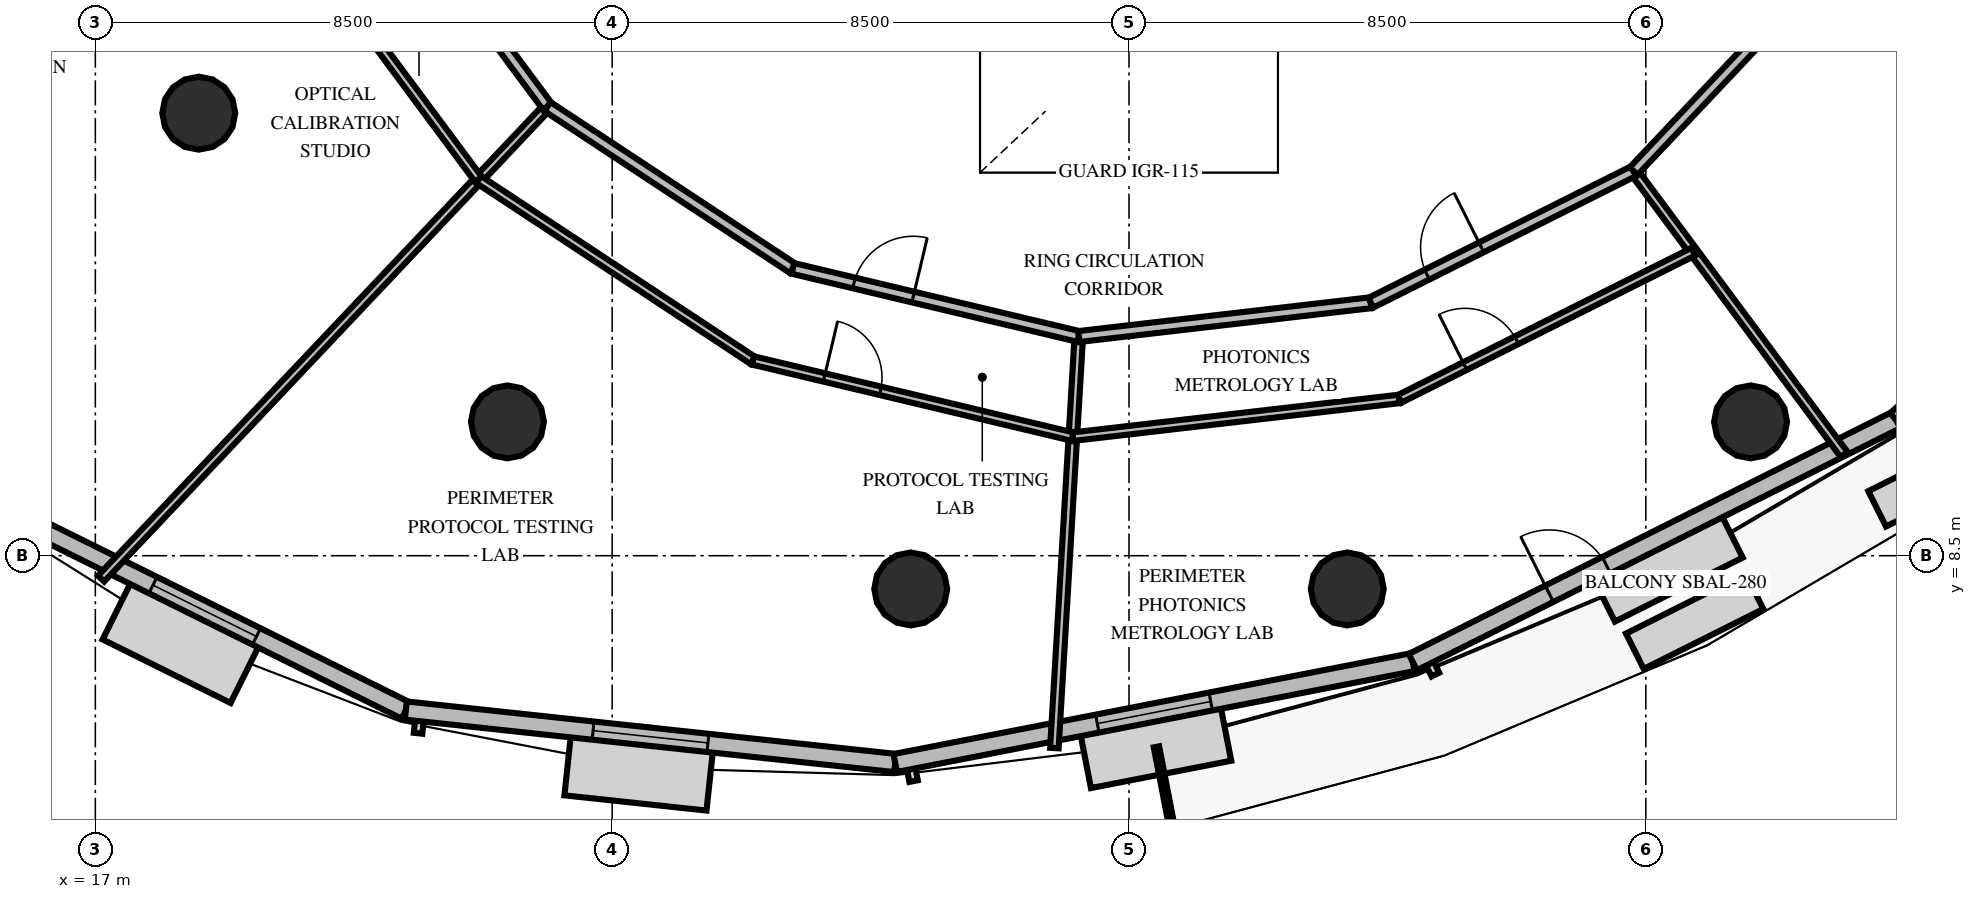
"""IFC4 building model, lengths in metres.
Left out: names, types, materials, properties, quantities, classifications, styles, units other than length and angle.
Written with IfcOpenShell. Run it as: python <this file> out.ifc"""

import sys

from ifc_helpers import new_model, si_unit, direction, frame, frame_2d, origin, origin_2d, place, context, subcontext, project, spatial, rectangle, circle, extrude, element, fill, save


model = new_model("IFC4")
c1 = context("Model", 3, precision=1e-05, world=origin(), true_north=direction((0.0, 1.0)))
c2 = subcontext(c1, "Body", "Model", "MODEL_VIEW")
j1 = project(units=[si_unit("LENGTHUNIT", "METRE"), si_unit("PLANEANGLEUNIT", "RADIAN")], contexts=[c1])
p1 = place(None, origin())
s1 = spatial("IfcSite", under=j1, at=p1, CompositionType="ELEMENT")
p2 = place(p1, origin())
s2 = spatial("IfcBuilding", under=s1, at=p2, CompositionType="ELEMENT")
p3 = place(p2, frame((0.0, 0.0, 145.8)))
s3 = spatial("IfcBuildingStorey", under=s2, at=p3, CompositionType="ELEMENT", Elevation=145.8)
for number, where, z_axis, x_axis in (
    (1, (18.701, 15.778, 0.0), (0.0, 0.0, 1.0), (1.0, 0.0, 0.0)),
    (2, (23.778, 10.701, 0.0), (0.0, 0.0, 1.0), (1.0, 0.0, 0.0)),
    (3, (30.41, 7.954, 0.0), (0.0, 0.0, 1.0), (1.0, 0.0, 0.0)),
    (4, (37.59, 7.954, 0.0), (0.0, 0.0, 1.0), (1.0, 0.0, 0.0)),
    (5, (44.222, 10.701, 0.0), (0.0, 0.0, 1.0), (1.0, 0.0, 0.0)),
):
    element("IfcColumn", number, at=place(p3, frame(where, z_axis=z_axis, x_axis=x_axis)), inside=s3, PredefinedType="COLUMN", context=c2, shape_type="SweptSolid", body=[
        extrude(circle(Radius=0.6, at=origin_2d()), origin(), (0.0, 0.0, 1.0), 4.0),
    ])
p4 = place(p3, frame((15.492, 9.235, 0.0), z_axis=(0.0, 0.0, 1.0), x_axis=(0.895870813497, -0.444314624477, 0.0)))
e6 = element("IfcWall", 6, at=p4, inside=s3, PredefinedType="SOLIDWALL", context=c2, shape_type="SweptSolid", body=[
    extrude(rectangle(XDim=7.383, YDim=0.3, at=frame_2d((3.692, 0.0))), origin(), (0.0, 0.0, 1.0), 2.9),
])
p5 = place(p4, frame((2.742, 0.0, 0.8)))
e7 = element("IfcOpeningElement", 7, at=p5, cuts=e6, PredefinedType="OPENING", context=c2, shape_type="SweptSolid", body=[
    extrude(rectangle(XDim=1.9, YDim=1.95, at=frame_2d((0.95, 0.975))), frame((0.0, 0.16, 0.0), z_axis=(0.0, -1.0, 0.0), x_axis=(1.0, 0.0, 0.0)), (0.0, 0.0, 1.0), 0.32),
])
p6 = place(p3, frame((22.106, 5.954, 0.0), z_axis=(0.0, 0.0, 1.0), x_axis=(0.994303675946, -0.106584238983, 0.0)))
e8 = element("IfcWall", 8, at=p6, inside=s3, PredefinedType="SOLIDWALL", context=c2, shape_type="SweptSolid", body=[
    extrude(rectangle(XDim=8.095, YDim=0.3, at=frame_2d((4.047, 0.0))), origin(), (0.0, 0.0, 1.0), 2.9),
])
p7 = place(p6, frame((3.098, 0.0, 0.8)))
e9 = element("IfcOpeningElement", 9, at=p7, cuts=e8, PredefinedType="OPENING", context=c2, shape_type="SweptSolid", body=[
    extrude(rectangle(XDim=1.9, YDim=1.95, at=frame_2d((0.95, 0.975))), frame((0.0, 0.16, 0.0), z_axis=(0.0, -1.0, 0.0), x_axis=(1.0, 0.0, 0.0)), (0.0, 0.0, 1.0), 0.32),
])
p8 = place(p3, frame((30.155, 5.091, 0.0), z_axis=(0.0, 0.0, 1.0), x_axis=(0.981531349689, 0.191301358011, 0.0)))
e10 = element("IfcWall", 10, at=p8, inside=s3, PredefinedType="SOLIDWALL", context=c2, shape_type="SweptSolid", body=[
    extrude(rectangle(XDim=8.673, YDim=0.3, at=frame_2d((4.336, 0.0))), origin(), (0.0, 0.0, 1.0), 2.9),
])
p9 = place(p8, frame((3.386, 0.0, 0.8)))
e11 = element("IfcOpeningElement", 11, at=p9, cuts=e10, PredefinedType="OPENING", context=c2, shape_type="SweptSolid", body=[
    extrude(rectangle(XDim=1.9, YDim=1.95, at=frame_2d((0.95, 0.975))), frame((0.0, 0.16, 0.0), z_axis=(0.0, -1.0, 0.0), x_axis=(1.0, 0.0, 0.0)), (0.0, 0.0, 1.0), 0.32),
])
p10 = place(p3, frame((38.668, 6.75, 0.0), z_axis=(0.0, 0.0, 1.0), x_axis=(0.894163416392, 0.447740756227, 0.0)))
e12 = element("IfcWall", 12, at=p10, inside=s3, PredefinedType="SOLIDWALL", context=c2, shape_type="SweptSolid", body=[
    extrude(rectangle(XDim=8.891, YDim=0.3, at=frame_2d((4.445, 0.0))), origin(), (0.0, 0.0, 1.0), 2.9),
])
p11 = place(p10, frame((2.51, 0.0, 0.0)))
e13 = element("IfcOpeningElement", 13, at=p11, cuts=e12, PredefinedType="OPENING", context=c2, shape_type="SweptSolid", body=[
    extrude(rectangle(XDim=1.05, YDim=2.15, at=frame_2d((0.525, 1.075))), frame((0.0, 0.16, 0.0), z_axis=(0.0, -1.0, 0.0), x_axis=(1.0, 0.0, 0.0)), (0.0, 0.0, 1.0), 0.32),
])
p12 = place(p3, frame((46.618, 10.731, 0.0), z_axis=(0.0, 0.0, 1.0), x_axis=(0.741123503334, 0.671368715987, 0.0)))
e14 = element("IfcWall", 14, at=p12, inside=s3, PredefinedType="SOLIDWALL", context=c2, shape_type="SweptSolid", body=[
    extrude(rectangle(XDim=8.673, YDim=0.3, at=frame_2d((4.336, 0.0))), origin(), (0.0, 0.0, 1.0), 2.9),
])
p13 = place(p12, frame((3.386, 0.0, 0.8)))
e15 = element("IfcOpeningElement", 15, at=p13, cuts=e14, PredefinedType="OPENING", context=c2, shape_type="SweptSolid", body=[
    extrude(rectangle(XDim=1.9, YDim=1.95, at=frame_2d((0.95, 0.975))), frame((0.0, 0.16, 0.0), z_axis=(0.0, -1.0, 0.0), x_axis=(1.0, 0.0, 0.0)), (0.0, 0.0, 1.0), 0.32),
])
p14 = place(p3, frame((24.436, 15.886, 0.0), z_axis=(0.0, 0.0, 1.0), x_axis=(-0.687099784948, -0.726563063694, 0.0)))
e16 = element("IfcWall", 16, at=p14, inside=s3, PredefinedType="PARTITIONING", context=c2, shape_type="SweptSolid", body=[
    extrude(rectangle(XDim=10.684, YDim=0.14, at=frame_2d((5.342, 0.0))), origin(), (0.0, 0.0, 1.0), 2.8),
])
p15 = place(p3, frame((21.553, 19.767, 0.0), z_axis=(0.0, 0.0, 1.0), x_axis=(0.596219858709, -0.802821200568, 0.0)))
e17 = element("IfcWall", 17, at=p15, inside=s3, PredefinedType="PARTITIONING", context=c2, shape_type="SweptSolid", body=[
    extrude(rectangle(XDim=4.834, YDim=0.18, at=frame_2d((2.417, 0.0))), origin(), (0.0, 0.0, 1.0), 2.8),
])
p16 = place(p3, frame((20.078, 19.028, 0.0), z_axis=(0.0, 0.0, 1.0), x_axis=(0.596244197079, -0.802803124963, 0.0)))
e18 = element("IfcWall", 18, at=p16, inside=s3, PredefinedType="PARTITIONING", context=c2, shape_type="SweptSolid", body=[
    extrude(rectangle(XDim=5.407, YDim=0.14, at=frame_2d((2.704, 0.0))), origin(), (0.0, 0.0, 1.0), 2.8),
])
p17 = place(p3, frame((33.175, 12.104, 0.0), z_axis=(0.0, 0.0, 1.0), x_axis=(-0.059306722547, -0.998239807191, 0.0)))
e19 = element("IfcWall", 19, at=p17, inside=s3, PredefinedType="PARTITIONING", context=c2, shape_type="SweptSolid", body=[
    extrude(rectangle(XDim=6.78, YDim=0.14, at=frame_2d((3.39, 0.0))), origin(), (0.0, 0.0, 1.0), 2.8),
])
p18 = place(p3, frame((24.436, 15.886, 0.0), z_axis=(0.0, 0.0, 1.0), x_axis=(0.834852183568, -0.550474187943, 0.0)))
e20 = element("IfcWall", 20, at=p18, inside=s3, PredefinedType="PARTITIONING", context=c2, shape_type="SweptSolid", body=[
    extrude(rectangle(XDim=4.834, YDim=0.18, at=frame_2d((2.417, 0.0))), origin(), (0.0, 0.0, 1.0), 2.8),
])
p19 = place(p3, frame((28.472, 13.225, 0.0), z_axis=(0.0, 0.0, 1.0), x_axis=(0.972776947404, -0.231743415441, 0.0)))
e21 = element("IfcWall", 21, at=p19, inside=s3, PredefinedType="PARTITIONING", context=c2, shape_type="SweptSolid", body=[
    extrude(rectangle(XDim=4.834, YDim=0.18, at=frame_2d((2.417, 0.0))), origin(), (0.0, 0.0, 1.0), 2.8),
])
p20 = place(p19, frame((1.034, 0.0, 0.0)))
e22 = element("IfcOpeningElement", 22, at=p20, cuts=e21, PredefinedType="OPENING", context=c2, shape_type="SweptSolid", body=[
    extrude(rectangle(XDim=1.0, YDim=2.15, at=frame_2d((0.5, 1.075))), frame((0.0, 0.1, 0.0), z_axis=(0.0, -1.0, 0.0), x_axis=(1.0, 0.0, 0.0)), (0.0, 0.0, 1.0), 0.2),
])
p21 = place(p3, frame((23.302, 14.687, 0.0), z_axis=(0.0, 0.0, 1.0), x_axis=(0.834859649207, -0.550462865347, 0.0)))
e23 = element("IfcWall", 23, at=p21, inside=s3, PredefinedType="PARTITIONING", context=c2, shape_type="SweptSolid", body=[
    extrude(rectangle(XDim=5.407, YDim=0.14, at=frame_2d((2.704, 0.0))), origin(), (0.0, 0.0, 1.0), 2.8),
])
p22 = place(p3, frame((27.816, 11.711, 0.0), z_axis=(0.0, 0.0, 1.0), x_axis=(0.972775687213, -0.231748705211, 0.0)))
e24 = element("IfcWall", 24, at=p22, inside=s3, PredefinedType="PARTITIONING", context=c2, shape_type="SweptSolid", body=[
    extrude(rectangle(XDim=5.407, YDim=0.14, at=frame_2d((2.704, 0.0))), origin(), (0.0, 0.0, 1.0), 2.8),
])
p23 = place(p22, frame((1.204, 0.0, 0.0)))
e25 = element("IfcOpeningElement", 25, at=p23, cuts=e24, PredefinedType="OPENING", context=c2, shape_type="SweptSolid", body=[
    extrude(rectangle(XDim=0.95, YDim=2.15, at=frame_2d((0.475, 1.075))), frame((0.0, 0.08, 0.0), z_axis=(0.0, -1.0, 0.0), x_axis=(1.0, 0.0, 0.0)), (0.0, 0.0, 1.0), 0.16),
])
p24 = place(p3, frame((42.3, 14.825, 0.0), z_axis=(0.0, 0.0, 1.0), x_axis=(0.596217105749, -0.802823245062, 0.0)))
e26 = element("IfcWall", 26, at=p24, inside=s3, PredefinedType="PARTITIONING", context=c2, shape_type="SweptSolid", body=[
    extrude(rectangle(XDim=5.803, YDim=0.14, at=frame_2d((2.902, 0.0))), origin(), (0.0, 0.0, 1.0), 2.8),
])
p25 = place(p3, frame((33.175, 12.104, 0.0), z_axis=(0.0, 0.0, 1.0), x_axis=(0.993372169668, 0.114942300873, 0.0)))
e27 = element("IfcWall", 27, at=p25, inside=s3, PredefinedType="PARTITIONING", context=c2, shape_type="SweptSolid", body=[
    extrude(rectangle(XDim=4.834, YDim=0.18, at=frame_2d((2.417, 0.0))), origin(), (0.0, 0.0, 1.0), 2.8),
])
p26 = place(p3, frame((37.977, 12.66, 0.0), z_axis=(0.0, 0.0, 1.0), x_axis=(0.894164433442, 0.447738725115, 0.0)))
e28 = element("IfcWall", 28, at=p26, inside=s3, PredefinedType="PARTITIONING", context=c2, shape_type="SweptSolid", body=[
    extrude(rectangle(XDim=4.834, YDim=0.18, at=frame_2d((2.417, 0.0))), origin(), (0.0, 0.0, 1.0), 2.8),
])
p27 = place(p26, frame((1.034, 0.0, 0.0)))
e29 = element("IfcOpeningElement", 29, at=p27, cuts=e28, PredefinedType="OPENING", context=c2, shape_type="SweptSolid", body=[
    extrude(rectangle(XDim=1.0, YDim=2.15, at=frame_2d((0.5, 1.075))), frame((0.0, 0.1, 0.0), z_axis=(0.0, -1.0, 0.0), x_axis=(1.0, 0.0, 0.0)), (0.0, 0.0, 1.0), 0.2),
])
p28 = place(p3, frame((33.077, 10.458, 0.0), z_axis=(0.0, 0.0, 1.0), x_axis=(0.993376467662, 0.114905149995, 0.0)))
e30 = element("IfcWall", 30, at=p28, inside=s3, PredefinedType="PARTITIONING", context=c2, shape_type="SweptSolid", body=[
    extrude(rectangle(XDim=5.407, YDim=0.14, at=frame_2d((2.704, 0.0))), origin(), (0.0, 0.0, 1.0), 2.8),
])
p29 = place(p3, frame((38.448, 11.079, 0.0), z_axis=(0.0, 0.0, 1.0), x_axis=(0.894156125226, 0.447755316798, 0.0)))
e31 = element("IfcWall", 31, at=p29, inside=s3, PredefinedType="PARTITIONING", context=c2, shape_type="SweptSolid", body=[
    extrude(rectangle(XDim=5.407, YDim=0.14, at=frame_2d((2.704, 0.0))), origin(), (0.0, 0.0, 1.0), 2.8),
])
p30 = place(p29, frame((1.204, 0.0, 0.0)))
e32 = element("IfcOpeningElement", 32, at=p30, cuts=e31, PredefinedType="OPENING", context=c2, shape_type="SweptSolid", body=[
    extrude(rectangle(XDim=0.95, YDim=2.15, at=frame_2d((0.475, 1.075))), frame((0.0, 0.08, 0.0), z_axis=(0.0, -1.0, 0.0), x_axis=(1.0, 0.0, 0.0)), (0.0, 0.0, 1.0), 0.16),
])
p31 = place(p3, frame((42.3, 14.825, 0.0), z_axis=(0.0, 0.0, 1.0), x_axis=(0.687059377982, 0.726601273827, 0.0)))
e33 = element("IfcWall", 33, at=p31, inside=s3, PredefinedType="PARTITIONING", context=c2, shape_type="SweptSolid", body=[
    extrude(rectangle(XDim=4.834, YDim=0.18, at=frame_2d((2.417, 0.0))), origin(), (0.0, 0.0, 1.0), 2.8),
])
p32 = place(p5, origin())
e34 = element("IfcWindow", 34, at=p32, inside=s3, PartitioningType="SINGLE_PANEL", PredefinedType="WINDOW", context=c2, shape_type="SweptSolid", body=[
    extrude(rectangle(XDim=1.9, YDim=1.95, at=frame_2d((0.95, 0.975))), frame((0.0, 0.03, 0.0), z_axis=(0.0, -1.0, 0.0), x_axis=(1.0, 0.0, 0.0)), (0.0, 0.0, 1.0), 0.06),
])
fill(e7, e34)
p33 = place(p7, origin())
e35 = element("IfcWindow", 35, at=p33, inside=s3, PartitioningType="SINGLE_PANEL", PredefinedType="WINDOW", context=c2, shape_type="SweptSolid", body=[
    extrude(rectangle(XDim=1.9, YDim=1.95, at=frame_2d((0.95, 0.975))), frame((0.0, 0.03, 0.0), z_axis=(0.0, -1.0, 0.0), x_axis=(1.0, 0.0, 0.0)), (0.0, 0.0, 1.0), 0.06),
])
fill(e9, e35)
p34 = place(p9, origin())
e36 = element("IfcWindow", 36, at=p34, inside=s3, PartitioningType="SINGLE_PANEL", PredefinedType="WINDOW", context=c2, shape_type="SweptSolid", body=[
    extrude(rectangle(XDim=1.9, YDim=1.95, at=frame_2d((0.95, 0.975))), frame((0.0, 0.03, 0.0), z_axis=(0.0, -1.0, 0.0), x_axis=(1.0, 0.0, 0.0)), (0.0, 0.0, 1.0), 0.06),
])
fill(e11, e36)
p35 = place(p11, origin())
e37 = element("IfcDoor", 37, at=p35, inside=s3, OperationType="SINGLE_SWING_LEFT", PredefinedType="DOOR", context=c2, shape_type="SweptSolid", body=[
    extrude(rectangle(XDim=1.05, YDim=2.15, at=frame_2d((0.525, 1.075))), frame((0.0, 0.025, 0.0), z_axis=(0.0, -1.0, 0.0), x_axis=(1.0, 0.0, 0.0)), (0.0, 0.0, 1.0), 0.05),
])
fill(e13, e37)
p36 = place(p20, origin())
e38 = element("IfcDoor", 38, at=p36, inside=s3, OperationType="SINGLE_SWING_RIGHT", PredefinedType="DOOR", context=c2, shape_type="SweptSolid", body=[
    extrude(rectangle(XDim=1.0, YDim=2.15, at=frame_2d((0.5, 1.075))), frame((0.0, 0.025, 0.0), z_axis=(0.0, -1.0, 0.0), x_axis=(1.0, 0.0, 0.0)), (0.0, 0.0, 1.0), 0.05),
])
fill(e22, e38)
p37 = place(p23, origin())
e39 = element("IfcDoor", 39, at=p37, inside=s3, OperationType="SINGLE_SWING_LEFT", PredefinedType="DOOR", context=c2, shape_type="SweptSolid", body=[
    extrude(rectangle(XDim=0.95, YDim=2.15, at=frame_2d((0.475, 1.075))), frame((0.0, 0.025, 0.0), z_axis=(0.0, -1.0, 0.0), x_axis=(1.0, 0.0, 0.0)), (0.0, 0.0, 1.0), 0.05),
])
fill(e25, e39)
p38 = place(p27, origin())
e40 = element("IfcDoor", 40, at=p38, inside=s3, OperationType="SINGLE_SWING_RIGHT", PredefinedType="DOOR", context=c2, shape_type="SweptSolid", body=[
    extrude(rectangle(XDim=1.0, YDim=2.15, at=frame_2d((0.5, 1.075))), frame((0.0, 0.025, 0.0), z_axis=(0.0, -1.0, 0.0), x_axis=(1.0, 0.0, 0.0)), (0.0, 0.0, 1.0), 0.05),
])
fill(e29, e40)
p39 = place(p30, origin())
e41 = element("IfcDoor", 41, at=p39, inside=s3, OperationType="SINGLE_SWING_LEFT", PredefinedType="DOOR", context=c2, shape_type="SweptSolid", body=[
    extrude(rectangle(XDim=0.95, YDim=2.15, at=frame_2d((0.475, 1.075))), frame((0.0, 0.025, 0.0), z_axis=(0.0, -1.0, 0.0), x_axis=(1.0, 0.0, 0.0)), (0.0, 0.0, 1.0), 0.05),
])
fill(e32, e41)
save(model, sys.argv[1])
